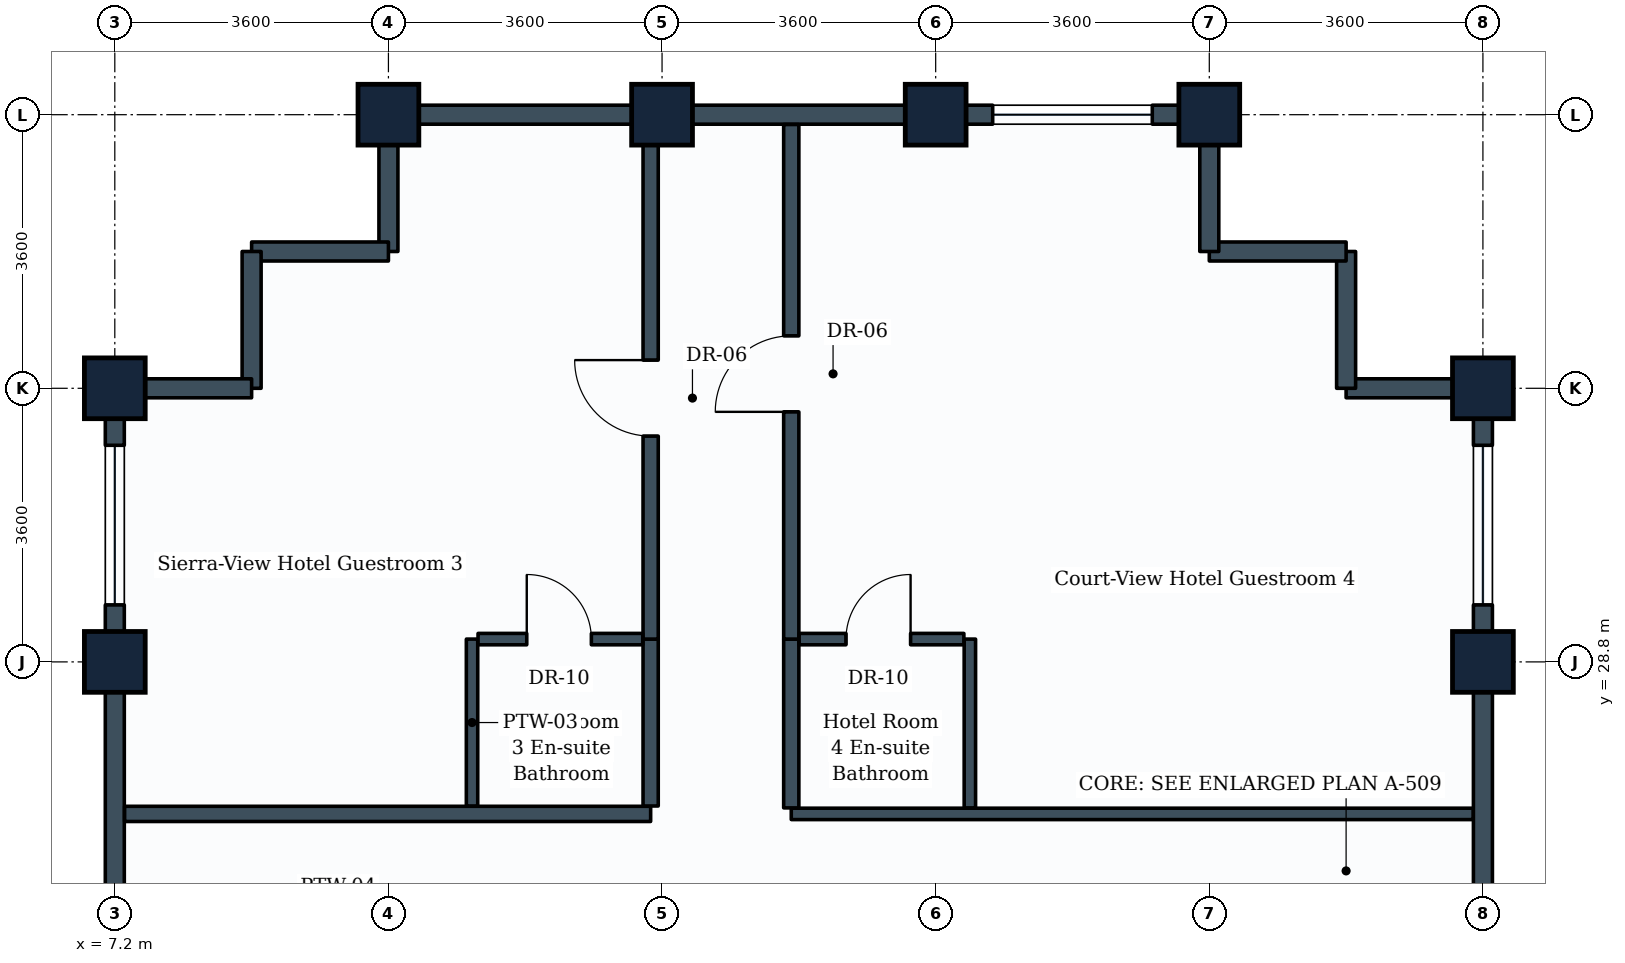
"""IFC4 building model, lengths in metres.
Left out: names, types, materials, properties, quantities, classifications, styles, units other than length and angle.
Written with IfcOpenShell. Run it as: python <this file> out.ifc"""

import sys

from ifc_helpers import new_model, si_unit, direction, frame, frame_2d, origin, origin_2d, place, context, subcontext, project, spatial, rectangle, extrude, element, fill, save


model = new_model("IFC4")
c1 = context("Model", 3, precision=1e-05, world=origin(), true_north=direction((0.0, 1.0)))
c2 = subcontext(c1, "Body", "Model", "MODEL_VIEW")
j1 = project(units=[si_unit("LENGTHUNIT", "METRE"), si_unit("PLANEANGLEUNIT", "RADIAN")], contexts=[c1])
p1 = place(None, origin())
s1 = spatial("IfcSite", under=j1, at=p1, CompositionType="ELEMENT")
p2 = place(p1, origin())
s2 = spatial("IfcBuilding", under=s1, at=p2, CompositionType="ELEMENT")
p3 = place(p2, frame((0.0, 0.0, 284.6)))
s3 = spatial("IfcBuildingStorey", under=s2, at=p3, CompositionType="ELEMENT", Elevation=284.6)
for number, where, z_axis, x_axis in (
    (1, (7.2, 28.8, 0.0), (0.0, 0.0, 1.0), (0.0, 1.0, 0.0)),
    (2, (7.2, 32.4, 0.0), (0.0, 0.0, 1.0), (0.0, 1.0, 0.0)),
    (3, (10.8, 36.0, 0.0), (0.0, 0.0, 1.0), (1.0, 0.0, 0.0)),
    (4, (14.4, 36.0, 0.0), (0.0, 0.0, 1.0), (1.0, 0.0, 0.0)),
    (5, (18.0, 36.0, 0.0), (0.0, 0.0, 1.0), (1.0, 0.0, 0.0)),
    (6, (21.6, 36.0, 0.0), (0.0, 0.0, 1.0), (1.0, 0.0, 0.0)),
    (7, (25.2, 28.8, 0.0), (0.0, 0.0, 1.0), (0.0, 1.0, 0.0)),
    (8, (25.2, 32.4, 0.0), (0.0, 0.0, 1.0), (0.0, 1.0, 0.0)),
):
    element("IfcColumn", number, at=place(p3, frame(where, z_axis=z_axis, x_axis=x_axis)), inside=s3, PredefinedType="COLUMN", context=c2, shape_type="SweptSolid", body=[
        extrude(rectangle(XDim=0.8, YDim=0.8, at=origin_2d()), origin(), (0.0, 0.0, 1.0), 3.6),
    ])
p4 = place(p3, frame((25.2, 28.8, 0.0), z_axis=(0.0, 0.0, 1.0), x_axis=(0.0, -1.0, 0.0)))
e9 = element("IfcWall", 9, at=p4, inside=s3, PredefinedType="STANDARD", context=c2, shape_type="SweptSolid", body=[
    extrude(rectangle(XDim=3.6, YDim=0.25, at=frame_2d((1.8, 0.0))), origin(), (0.0, 0.0, 1.0), 2.83),
])
p5 = place(p3, frame((25.2, 32.4, 0.0), z_axis=(0.0, 0.0, 1.0), x_axis=(0.0, -1.0, 0.0)))
e10 = element("IfcWall", 10, at=p5, inside=s3, PredefinedType="STANDARD", context=c2, shape_type="SweptSolid", body=[
    extrude(rectangle(XDim=3.6, YDim=0.25, at=frame_2d((1.8, 0.0))), origin(), (0.0, 0.0, 1.0), 2.83),
])
p6 = place(p5, frame((0.75, 0.0, 0.85)))
e11 = element("IfcOpeningElement", 11, at=p6, cuts=e10, PredefinedType="OPENING", context=c2, shape_type="SweptSolid", body=[
    extrude(rectangle(XDim=2.1, YDim=1.35, at=frame_2d((1.05, 0.675))), frame((0.0, 0.135, 0.0), z_axis=(0.0, -1.0, 0.0), x_axis=(1.0, 0.0, 0.0)), (0.0, 0.0, 1.0), 0.27),
])
p7 = place(p3, frame((23.4, 32.4, 0.0), z_axis=(0.0, 0.0, 1.0), x_axis=(1.0, 0.0, 0.0)))
e12 = element("IfcWall", 12, at=p7, inside=s3, PredefinedType="STANDARD", context=c2, shape_type="SweptSolid", body=[
    extrude(rectangle(XDim=1.8, YDim=0.25, at=frame_2d((0.9, 0.0))), origin(), (0.0, 0.0, 1.0), 2.83),
])
p8 = place(p3, frame((23.4, 32.4, 0.0), z_axis=(0.0, 0.0, 1.0), x_axis=(0.0, 1.0, 0.0)))
e13 = element("IfcWall", 13, at=p8, inside=s3, PredefinedType="STANDARD", context=c2, shape_type="SweptSolid", body=[
    extrude(rectangle(XDim=1.8, YDim=0.25, at=frame_2d((0.9, 0.0))), origin(), (0.0, 0.0, 1.0), 3.335),
])
p9 = place(p3, frame((21.6, 34.2, 0.0), z_axis=(0.0, 0.0, 1.0), x_axis=(1.0, 0.0, 0.0)))
e14 = element("IfcWall", 14, at=p9, inside=s3, PredefinedType="STANDARD", context=c2, shape_type="SweptSolid", body=[
    extrude(rectangle(XDim=1.8, YDim=0.25, at=frame_2d((0.9, 0.0))), origin(), (0.0, 0.0, 1.0), 3.335),
])
p10 = place(p3, frame((21.6, 34.2, 0.0), z_axis=(0.0, 0.0, 1.0), x_axis=(0.0, 1.0, 0.0)))
e15 = element("IfcWall", 15, at=p10, inside=s3, PredefinedType="STANDARD", context=c2, shape_type="SweptSolid", body=[
    extrude(rectangle(XDim=1.8, YDim=0.25, at=frame_2d((0.9, 0.0))), origin(), (0.0, 0.0, 1.0), 2.83),
])
p11 = place(p3, frame((18.0, 36.0, 0.0), z_axis=(0.0, 0.0, 1.0), x_axis=(1.0, 0.0, 0.0)))
e16 = element("IfcWall", 16, at=p11, inside=s3, PredefinedType="STANDARD", context=c2, shape_type="SweptSolid", body=[
    extrude(rectangle(XDim=3.6, YDim=0.25, at=frame_2d((1.8, 0.0))), origin(), (0.0, 0.0, 1.0), 2.83),
])
p12 = place(p11, frame((0.75, 0.0, 0.85)))
e17 = element("IfcOpeningElement", 17, at=p12, cuts=e16, PredefinedType="OPENING", context=c2, shape_type="SweptSolid", body=[
    extrude(rectangle(XDim=2.1, YDim=1.35, at=frame_2d((1.05, 0.675))), frame((0.0, 0.135, 0.0), z_axis=(0.0, -1.0, 0.0), x_axis=(1.0, 0.0, 0.0)), (0.0, 0.0, 1.0), 0.27),
])
p13 = place(p3, frame((14.4, 36.0, 0.0), z_axis=(0.0, 0.0, 1.0), x_axis=(1.0, 0.0, 0.0)))
e18 = element("IfcWall", 18, at=p13, inside=s3, PredefinedType="STANDARD", context=c2, shape_type="SweptSolid", body=[
    extrude(rectangle(XDim=3.6, YDim=0.25, at=frame_2d((1.8, 0.0))), origin(), (0.0, 0.0, 1.0), 2.83),
])
p14 = place(p3, frame((10.8, 36.0, 0.0), z_axis=(0.0, 0.0, 1.0), x_axis=(1.0, 0.0, 0.0)))
e19 = element("IfcWall", 19, at=p14, inside=s3, PredefinedType="STANDARD", context=c2, shape_type="SweptSolid", body=[
    extrude(rectangle(XDim=3.6, YDim=0.25, at=frame_2d((1.8, 0.0))), origin(), (0.0, 0.0, 1.0), 2.83),
])
p15 = place(p3, frame((10.8, 34.2, 0.0), z_axis=(0.0, 0.0, 1.0), x_axis=(0.0, 1.0, 0.0)))
e20 = element("IfcWall", 20, at=p15, inside=s3, PredefinedType="STANDARD", context=c2, shape_type="SweptSolid", body=[
    extrude(rectangle(XDim=1.8, YDim=0.25, at=frame_2d((0.9, 0.0))), origin(), (0.0, 0.0, 1.0), 2.83),
])
for number, where, z_axis, x_axis in (
    (21, (9.0, 34.2, 0.0), (0.0, 0.0, 1.0), (1.0, 0.0, 0.0)),
    (22, (9.0, 32.4, 0.0), (0.0, 0.0, 1.0), (0.0, 1.0, 0.0)),
):
    element("IfcWall", number, at=place(p3, frame(where, z_axis=z_axis, x_axis=x_axis)), inside=s3, PredefinedType="STANDARD", context=c2, shape_type="SweptSolid", body=[
        extrude(rectangle(XDim=1.8, YDim=0.25, at=frame_2d((0.9, 0.0))), origin(), (0.0, 0.0, 1.0), 3.335),
    ])
p16 = place(p3, frame((7.2, 32.4, 0.0), z_axis=(0.0, 0.0, 1.0), x_axis=(1.0, 0.0, 0.0)))
e23 = element("IfcWall", 23, at=p16, inside=s3, PredefinedType="STANDARD", context=c2, shape_type="SweptSolid", body=[
    extrude(rectangle(XDim=1.8, YDim=0.25, at=frame_2d((0.9, 0.0))), origin(), (0.0, 0.0, 1.0), 2.83),
])
p17 = place(p3, frame((7.2, 28.8, 0.0), z_axis=(0.0, 0.0, 1.0), x_axis=(0.0, 1.0, 0.0)))
e24 = element("IfcWall", 24, at=p17, inside=s3, PredefinedType="STANDARD", context=c2, shape_type="SweptSolid", body=[
    extrude(rectangle(XDim=3.6, YDim=0.25, at=frame_2d((1.8, 0.0))), origin(), (0.0, 0.0, 1.0), 2.83),
])
p18 = place(p17, frame((0.75, 0.0, 0.85)))
e25 = element("IfcOpeningElement", 25, at=p18, cuts=e24, PredefinedType="OPENING", context=c2, shape_type="SweptSolid", body=[
    extrude(rectangle(XDim=2.1, YDim=1.35, at=frame_2d((1.05, 0.675))), frame((0.0, 0.135, 0.0), z_axis=(0.0, -1.0, 0.0), x_axis=(1.0, 0.0, 0.0)), (0.0, 0.0, 1.0), 0.27),
])
p19 = place(p3, frame((7.2, 25.2, 0.0), z_axis=(0.0, 0.0, 1.0), x_axis=(0.0, 1.0, 0.0)))
e26 = element("IfcWall", 26, at=p19, inside=s3, PredefinedType="STANDARD", context=c2, shape_type="SweptSolid", body=[
    extrude(rectangle(XDim=3.6, YDim=0.25, at=frame_2d((1.8, 0.0))), origin(), (0.0, 0.0, 1.0), 2.83),
])
p20 = place(p3, frame((7.329, 26.8, 0.0), z_axis=(0.0, 0.0, 1.0), x_axis=(1.0, 0.0, 0.0)))
e27 = element("IfcWall", 27, at=p20, inside=s3, PredefinedType="PARTITIONING", context=c2, shape_type="SweptSolid", body=[
    extrude(rectangle(XDim=6.921, YDim=0.2, at=frame_2d((3.46, 0.0))), origin(), (0.0, 0.0, 1.0), 2.83),
])
p21 = place(p3, frame((14.25, 26.904, 0.0), z_axis=(0.0, 0.0, 1.0), x_axis=(0.0, 1.0, 0.0)))
e28 = element("IfcWall", 28, at=p21, inside=s3, PredefinedType="PARTITIONING", context=c2, shape_type="SweptSolid", body=[
    extrude(rectangle(XDim=2.196, YDim=0.2, at=frame_2d((1.098, 0.0))), origin(), (0.0, 0.0, 1.0), 3.03),
])
p22 = place(p3, frame((14.25, 29.1, 0.0), z_axis=(0.0, 0.0, 1.0), x_axis=(0.0, 1.0, 0.0)))
e29 = element("IfcWall", 29, at=p22, inside=s3, PredefinedType="PARTITIONING", context=c2, shape_type="SweptSolid", body=[
    extrude(rectangle(XDim=6.771, YDim=0.2, at=frame_2d((3.385, 0.0))), origin(), (0.0, 0.0, 1.0), 2.83),
])
p23 = place(p22, frame((2.671, 0.0, 0.0)))
e30 = element("IfcOpeningElement", 30, at=p23, cuts=e29, PredefinedType="OPENING", context=c2, shape_type="SweptSolid", body=[
    extrude(rectangle(XDim=1.0, YDim=2.1, at=frame_2d((0.5, 1.05))), frame((0.0, 0.11, 0.0), z_axis=(0.0, -1.0, 0.0), x_axis=(1.0, 0.0, 0.0)), (0.0, 0.0, 1.0), 0.22),
])
p24 = place(p3, frame((11.9, 26.904, 0.0), z_axis=(0.0, 0.0, 1.0), x_axis=(0.0, 1.0, 0.0)))
e31 = element("IfcWall", 31, at=p24, inside=s3, PredefinedType="PARTITIONING", context=c2, shape_type="SweptSolid", body=[
    extrude(rectangle(XDim=2.196, YDim=0.15, at=frame_2d((1.098, 0.0))), origin(), (0.0, 0.0, 1.0), 3.03),
])
p25 = place(p3, frame((11.979, 29.1, 0.0), z_axis=(0.0, 0.0, 1.0), x_axis=(1.0, 0.0, 0.0)))
e32 = element("IfcWall", 32, at=p25, inside=s3, PredefinedType="PARTITIONING", context=c2, shape_type="SweptSolid", body=[
    extrude(rectangle(XDim=2.167, YDim=0.15, at=frame_2d((1.083, 0.0))), origin(), (0.0, 0.0, 1.0), 3.335),
])
p26 = place(p25, frame((0.641, 0.0, 0.0)))
e33 = element("IfcOpeningElement", 33, at=p26, cuts=e32, PredefinedType="OPENING", context=c2, shape_type="SweptSolid", body=[
    extrude(rectangle(XDim=0.85, YDim=2.1, at=frame_2d((0.425, 1.05))), frame((0.0, 0.085, 0.0), z_axis=(0.0, -1.0, 0.0), x_axis=(1.0, 0.0, 0.0)), (0.0, 0.0, 1.0), 0.17),
])
p27 = place(p3, frame((16.1, 26.8, 0.0), z_axis=(0.0, 0.0, 1.0), x_axis=(1.0, 0.0, 0.0)))
e34 = element("IfcWall", 34, at=p27, inside=s3, PredefinedType="PARTITIONING", context=c2, shape_type="SweptSolid", body=[
    extrude(rectangle(XDim=8.971, YDim=0.15, at=frame_2d((4.485, 0.0))), origin(), (0.0, 0.0, 1.0), 2.83),
])
p28 = place(p3, frame((16.1, 26.879, 0.0), z_axis=(0.0, 0.0, 1.0), x_axis=(0.0, 1.0, 0.0)))
e35 = element("IfcWall", 35, at=p28, inside=s3, PredefinedType="PARTITIONING", context=c2, shape_type="SweptSolid", body=[
    extrude(rectangle(XDim=2.221, YDim=0.2, at=frame_2d((1.111, 0.0))), origin(), (0.0, 0.0, 1.0), 3.03),
])
p29 = place(p3, frame((16.1, 29.1, 0.0), z_axis=(0.0, 0.0, 1.0), x_axis=(0.0, 1.0, 0.0)))
e36 = element("IfcWall", 36, at=p29, inside=s3, PredefinedType="PARTITIONING", context=c2, shape_type="SweptSolid", body=[
    extrude(rectangle(XDim=6.771, YDim=0.2, at=frame_2d((3.385, 0.0))), origin(), (0.0, 0.0, 1.0), 2.83),
])
p30 = place(p29, frame((2.99, 0.0, 0.0)))
e37 = element("IfcOpeningElement", 37, at=p30, cuts=e36, PredefinedType="OPENING", context=c2, shape_type="SweptSolid", body=[
    extrude(rectangle(XDim=1.0, YDim=2.1, at=frame_2d((0.5, 1.05))), frame((0.0, 0.11, 0.0), z_axis=(0.0, -1.0, 0.0), x_axis=(1.0, 0.0, 0.0)), (0.0, 0.0, 1.0), 0.22),
])
p31 = place(p3, frame((18.45, 26.879, 0.0), z_axis=(0.0, 0.0, 1.0), x_axis=(0.0, 1.0, 0.0)))
e38 = element("IfcWall", 38, at=p31, inside=s3, PredefinedType="PARTITIONING", context=c2, shape_type="SweptSolid", body=[
    extrude(rectangle(XDim=2.221, YDim=0.15, at=frame_2d((1.111, 0.0))), origin(), (0.0, 0.0, 1.0), 3.03),
])
p32 = place(p3, frame((16.204, 29.1, 0.0), z_axis=(0.0, 0.0, 1.0), x_axis=(1.0, 0.0, 0.0)))
e39 = element("IfcWall", 39, at=p32, inside=s3, PredefinedType="PARTITIONING", context=c2, shape_type="SweptSolid", body=[
    extrude(rectangle(XDim=2.167, YDim=0.15, at=frame_2d((1.083, 0.0))), origin(), (0.0, 0.0, 1.0), 3.03),
])
p33 = place(p32, frame((0.616, 0.0, 0.0)))
e40 = element("IfcOpeningElement", 40, at=p33, cuts=e39, PredefinedType="OPENING", context=c2, shape_type="SweptSolid", body=[
    extrude(rectangle(XDim=0.85, YDim=2.1, at=frame_2d((0.425, 1.05))), frame((0.0, 0.085, 0.0), z_axis=(0.0, -1.0, 0.0), x_axis=(1.0, 0.0, 0.0)), (0.0, 0.0, 1.0), 0.17),
])
p34 = place(p6, origin())
e41 = element("IfcWindow", 41, at=p34, inside=s3, PartitioningType="SINGLE_PANEL", PredefinedType="WINDOW", context=c2, shape_type="SweptSolid", body=[
    extrude(rectangle(XDim=2.1, YDim=1.35, at=frame_2d((1.05, 0.675))), frame((0.0, 0.03, 0.0), z_axis=(0.0, -1.0, 0.0), x_axis=(1.0, 0.0, 0.0)), (0.0, 0.0, 1.0), 0.06),
])
fill(e11, e41)
p35 = place(p12, origin())
e42 = element("IfcWindow", 42, at=p35, inside=s3, PartitioningType="SINGLE_PANEL", PredefinedType="WINDOW", context=c2, shape_type="SweptSolid", body=[
    extrude(rectangle(XDim=2.1, YDim=1.35, at=frame_2d((1.05, 0.675))), frame((0.0, 0.03, 0.0), z_axis=(0.0, -1.0, 0.0), x_axis=(1.0, 0.0, 0.0)), (0.0, 0.0, 1.0), 0.06),
])
fill(e17, e42)
p36 = place(p18, origin())
e43 = element("IfcWindow", 43, at=p36, inside=s3, PartitioningType="SINGLE_PANEL", PredefinedType="WINDOW", context=c2, shape_type="SweptSolid", body=[
    extrude(rectangle(XDim=2.1, YDim=1.35, at=frame_2d((1.05, 0.675))), frame((0.0, 0.03, 0.0), z_axis=(0.0, -1.0, 0.0), x_axis=(1.0, 0.0, 0.0)), (0.0, 0.0, 1.0), 0.06),
])
fill(e25, e43)
p37 = place(p23, origin())
e44 = element("IfcDoor", 44, at=p37, inside=s3, OperationType="SINGLE_SWING_RIGHT", PredefinedType="DOOR", context=c2, shape_type="SweptSolid", body=[
    extrude(rectangle(XDim=1.0, YDim=2.1, at=frame_2d((0.5, 1.05))), frame((0.0, 0.025, 0.0), z_axis=(0.0, -1.0, 0.0), x_axis=(1.0, 0.0, 0.0)), (0.0, 0.0, 1.0), 0.05),
])
fill(e30, e44)
p38 = place(p26, origin())
e45 = element("IfcDoor", 45, at=p38, inside=s3, OperationType="SINGLE_SWING_LEFT", PredefinedType="DOOR", context=c2, shape_type="SweptSolid", body=[
    extrude(rectangle(XDim=0.85, YDim=2.1, at=frame_2d((0.425, 1.05))), frame((0.0, 0.025, 0.0), z_axis=(0.0, -1.0, 0.0), x_axis=(1.0, 0.0, 0.0)), (0.0, 0.0, 1.0), 0.05),
])
fill(e33, e45)
p39 = place(p30, origin())
e46 = element("IfcDoor", 46, at=p39, inside=s3, OperationType="SINGLE_SWING_LEFT", PredefinedType="DOOR", context=c2, shape_type="SweptSolid", body=[
    extrude(rectangle(XDim=1.0, YDim=2.1, at=frame_2d((0.5, 1.05))), frame((0.0, 0.025, 0.0), z_axis=(0.0, -1.0, 0.0), x_axis=(1.0, 0.0, 0.0)), (0.0, 0.0, 1.0), 0.05),
])
fill(e37, e46)
p40 = place(p33, origin())
e47 = element("IfcDoor", 47, at=p40, inside=s3, OperationType="SINGLE_SWING_RIGHT", PredefinedType="DOOR", context=c2, shape_type="SweptSolid", body=[
    extrude(rectangle(XDim=0.85, YDim=2.1, at=frame_2d((0.425, 1.05))), frame((0.0, 0.025, 0.0), z_axis=(0.0, -1.0, 0.0), x_axis=(1.0, 0.0, 0.0)), (0.0, 0.0, 1.0), 0.05),
])
fill(e40, e47)
save(model, sys.argv[1])
